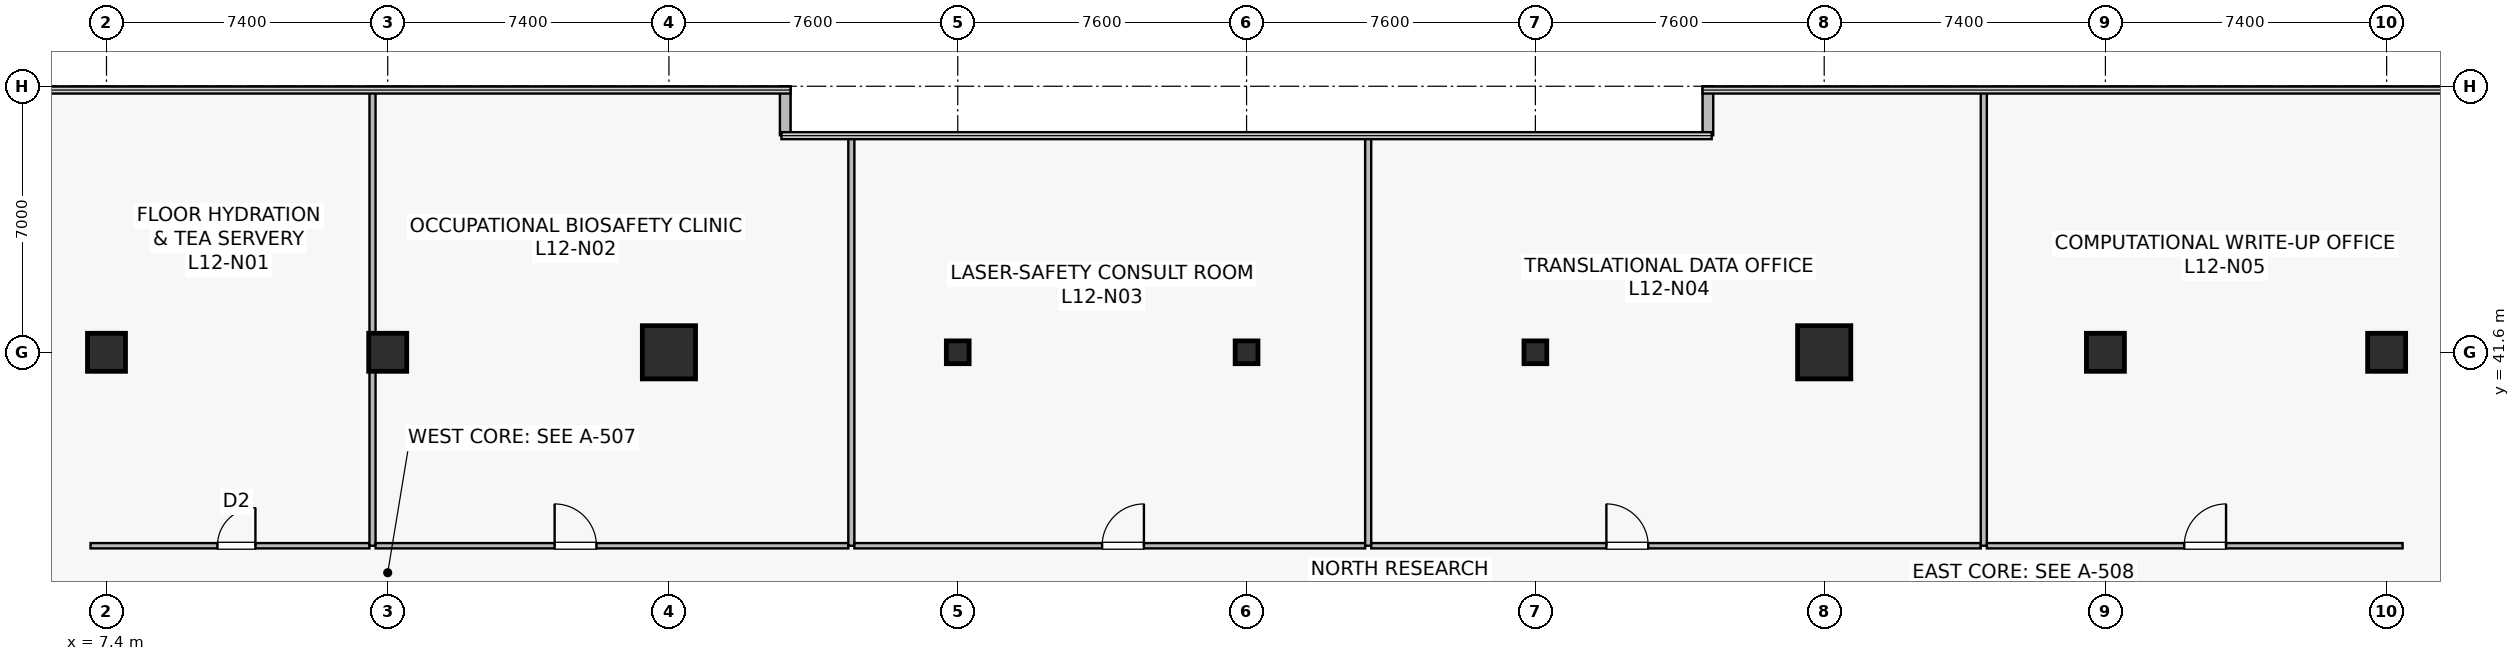
"""IFC4 building model, lengths in metres.
Left out: names, types, materials, properties, quantities, classifications, styles, units other than length and angle.
Written with IfcOpenShell. Run it as: python <this file> out.ifc"""

import sys

from ifc_helpers import new_model, si_unit, direction, frame, frame_2d, origin, origin_2d, place, context, subcontext, project, spatial, rectangle, hollow_rectangle, extrude, source, transform, mapped, element, fill, save


model = new_model("IFC4")
c1 = context("Model", 3, precision=1e-05, world=origin(), true_north=direction((0.0, 1.0)))
c2 = subcontext(c1, "Body", "Model", "MODEL_VIEW")
j1 = project(units=[si_unit("LENGTHUNIT", "METRE"), si_unit("PLANEANGLEUNIT", "RADIAN")], contexts=[c1])
p1 = place(None, origin())
s1 = spatial("IfcSite", under=j1, at=p1, CompositionType="ELEMENT")
p2 = place(p1, origin())
s2 = spatial("IfcBuilding", under=s1, at=p2, CompositionType="ELEMENT")
p3 = place(p2, frame((0.0, 0.0, 49.8)))
s3 = spatial("IfcBuildingStorey", under=s2, at=p3, CompositionType="ELEMENT", Elevation=49.8)
m1 = source(origin(), c2, "Body", "SweptSolid", [
    extrude(rectangle(XDim=1.0, YDim=1.0, at=origin_2d()), origin(), (0.0, 0.0, 1.0), 4.1),
])
p4 = place(p3, frame((14.8, 41.6, 0.0), z_axis=(0.0, 0.0, 1.0), x_axis=(1.0, 0.0, 0.0)))
e1 = element("IfcColumn", 1, at=p4, inside=s3, PredefinedType="COLUMN", context=c2, shape_type="MappedRepresentation", body=[
    mapped(m1, transform((0.0, 0.0, 0.0), scale=1.0)),
])
m2 = source(origin(), c2, "Body", "SweptSolid", [
    extrude(rectangle(XDim=1.4, YDim=1.4, at=origin_2d()), origin(), (0.0, 0.0, 1.0), 4.1),
])
for number, where, z_axis, x_axis in (
    (2, (22.2, 41.6, 0.0), (0.0, 0.0, 1.0), (1.0, 0.0, 0.0)),
    (3, (52.6, 41.6, 0.0), (0.0, 0.0, 1.0), (1.0, 0.0, 0.0)),
):
    element("IfcColumn", number, at=place(p3, frame(where, z_axis=z_axis, x_axis=x_axis)), inside=s3, PredefinedType="COLUMN", context=c2, shape_type="MappedRepresentation", body=[
        mapped(m2, transform((0.0, 0.0, 0.0), scale=1.0)),
    ])
for number, where, z_axis, x_axis in (
    (4, (60.0, 41.6, 0.0), (0.0, 0.0, 1.0), (1.0, 0.0, 0.0)),
    (5, (7.4, 41.6, 0.0), (0.0, 0.0, 1.0), (1.0, 0.0, 0.0)),
    (6, (67.4, 41.6, 0.0), (0.0, 0.0, 1.0), (1.0, 0.0, 0.0)),
):
    element("IfcColumn", number, at=place(p3, frame(where, z_axis=z_axis, x_axis=x_axis)), inside=s3, PredefinedType="COLUMN", context=c2, shape_type="MappedRepresentation", body=[
        mapped(m1, transform((0.0, 0.0, 0.0), scale=1.0)),
    ])
m3 = source(origin(), c2, "Body", "SweptSolid", [
    extrude(hollow_rectangle(XDim=0.6, YDim=0.6, WallThickness=0.028, at=origin_2d()), origin(), (0.0, 0.0, 1.0), 4.1),
])
for number, where, z_axis, x_axis in (
    (7, (29.8, 41.6, 0.0), (0.0, 0.0, 1.0), (1.0, 0.0, 0.0)),
    (8, (37.4, 41.6, 0.0), (0.0, 0.0, 1.0), (1.0, 0.0, 0.0)),
    (9, (45.0, 41.6, 0.0), (0.0, 0.0, 1.0), (1.0, 0.0, 0.0)),
):
    element("IfcColumn", number, at=place(p3, frame(where, z_axis=z_axis, x_axis=x_axis)), inside=s3, PredefinedType="COLUMN", context=c2, shape_type="MappedRepresentation", body=[
        mapped(m3, transform((0.0, 0.0, 0.0), scale=1.0)),
    ])
for number, where, z_axis, x_axis in (
    (10, (49.54, 48.6, 0.0), (0.0, 0.0, 1.0), (0.0, -1.0, 0.0)),
    (11, (25.26, 47.312, 0.0), (0.0, 0.0, 1.0), (0.0, 1.0, 0.0)),
):
    element("IfcWall", number, at=place(p3, frame(where, z_axis=z_axis, x_axis=x_axis)), inside=s3, PredefinedType="STANDARD", context=c2, shape_type="SweptSolid", body=[
        extrude(rectangle(XDim=1.288, YDim=0.28, at=frame_2d((0.644, 0.0))), origin(), (0.0, 0.0, 1.0), 3.78),
    ])
p5 = place(p3, frame((6.98, 36.51, 0.0), z_axis=(0.0, 0.0, 1.0), x_axis=(1.0, 0.0, 0.0)))
e12 = element("IfcWall", 12, at=p5, inside=s3, PredefinedType="PARTITIONING", context=c2, shape_type="SweptSolid", body=[
    extrude(rectangle(XDim=7.34, YDim=0.14, at=frame_2d((3.67, 0.0))), origin(), (0.0, 0.0, 1.0), 3.265),
])
p6 = place(p5, frame((3.339, 0.0, 0.0)))
e13 = element("IfcOpeningElement", 13, at=p6, cuts=e12, PredefinedType="OPENING", context=c2, shape_type="SweptSolid", body=[
    extrude(rectangle(XDim=1.0, YDim=2.15, at=frame_2d((0.5, 1.075))), frame((0.0, 0.08, 0.0), z_axis=(0.0, -1.0, 0.0), x_axis=(1.0, 0.0, 0.0)), (0.0, 0.0, 1.0), 0.16),
])
p7 = place(p3, frame((14.4, 36.51, 0.0), z_axis=(0.0, 0.0, 1.0), x_axis=(0.0, 1.0, 0.0)))
e14 = element("IfcWall", 14, at=p7, inside=s3, PredefinedType="PARTITIONING", context=c2, shape_type="SweptSolid", body=[
    extrude(rectangle(XDim=11.98, YDim=0.16, at=frame_2d((5.99, 0.0))), origin(), (0.0, 0.0, 1.0), 3.015),
])
p8 = place(p3, frame((14.48, 36.51, 0.0), z_axis=(0.0, 0.0, 1.0), x_axis=(1.0, 0.0, 0.0)))
e15 = element("IfcWall", 15, at=p8, inside=s3, PredefinedType="PARTITIONING", context=c2, shape_type="SweptSolid", body=[
    extrude(rectangle(XDim=12.44, YDim=0.14, at=frame_2d((6.22, 0.0))), origin(), (0.0, 0.0, 1.0), 3.065),
])
p9 = place(p8, frame((4.712, 0.0, 0.0)))
e16 = element("IfcOpeningElement", 16, at=p9, cuts=e15, PredefinedType="OPENING", context=c2, shape_type="SweptSolid", body=[
    extrude(rectangle(XDim=1.1, YDim=2.18, at=frame_2d((0.55, 1.09))), frame((0.0, 0.08, 0.0), z_axis=(0.0, -1.0, 0.0), x_axis=(1.0, 0.0, 0.0)), (0.0, 0.0, 1.0), 0.16),
])
p10 = place(p3, frame((27.0, 36.51, 0.0), z_axis=(0.0, 0.0, 1.0), x_axis=(0.0, 1.0, 0.0)))
e17 = element("IfcWall", 17, at=p10, inside=s3, PredefinedType="PARTITIONING", context=c2, shape_type="SweptSolid", body=[
    extrude(rectangle(XDim=10.78, YDim=0.16, at=frame_2d((5.39, 0.0))), origin(), (0.0, 0.0, 1.0), 3.015),
])
p11 = place(p3, frame((27.08, 36.51, 0.0), z_axis=(0.0, 0.0, 1.0), x_axis=(1.0, 0.0, 0.0)))
e18 = element("IfcWall", 18, at=p11, inside=s3, PredefinedType="PARTITIONING", context=c2, shape_type="SweptSolid", body=[
    extrude(rectangle(XDim=13.44, YDim=0.14, at=frame_2d((6.72, 0.0))), origin(), (0.0, 0.0, 1.0), 3.065),
])
p12 = place(p11, frame((6.519, 0.0, 0.0)))
e19 = element("IfcOpeningElement", 19, at=p12, cuts=e18, PredefinedType="OPENING", context=c2, shape_type="SweptSolid", body=[
    extrude(rectangle(XDim=1.1, YDim=2.18, at=frame_2d((0.55, 1.09))), frame((0.0, 0.08, 0.0), z_axis=(0.0, -1.0, 0.0), x_axis=(1.0, 0.0, 0.0)), (0.0, 0.0, 1.0), 0.16),
])
p13 = place(p3, frame((40.6, 36.51, 0.0), z_axis=(0.0, 0.0, 1.0), x_axis=(0.0, 1.0, 0.0)))
e20 = element("IfcWall", 20, at=p13, inside=s3, PredefinedType="PARTITIONING", context=c2, shape_type="SweptSolid", body=[
    extrude(rectangle(XDim=10.78, YDim=0.16, at=frame_2d((5.39, 0.0))), origin(), (0.0, 0.0, 1.0), 3.015),
])
p14 = place(p3, frame((40.68, 36.51, 0.0), z_axis=(0.0, 0.0, 1.0), x_axis=(1.0, 0.0, 0.0)))
e21 = element("IfcWall", 21, at=p14, inside=s3, PredefinedType="PARTITIONING", context=c2, shape_type="SweptSolid", body=[
    extrude(rectangle(XDim=16.04, YDim=0.14, at=frame_2d((8.02, 0.0))), origin(), (0.0, 0.0, 1.0), 3.065),
])
p15 = place(p14, frame((6.188, 0.0, 0.0)))
e22 = element("IfcOpeningElement", 22, at=p15, cuts=e21, PredefinedType="OPENING", context=c2, shape_type="SweptSolid", body=[
    extrude(rectangle(XDim=1.1, YDim=2.18, at=frame_2d((0.55, 1.09))), frame((0.0, 0.08, 0.0), z_axis=(0.0, -1.0, 0.0), x_axis=(1.0, 0.0, 0.0)), (0.0, 0.0, 1.0), 0.16),
])
p16 = place(p3, frame((56.8, 36.51, 0.0), z_axis=(0.0, 0.0, 1.0), x_axis=(0.0, 1.0, 0.0)))
e23 = element("IfcWall", 23, at=p16, inside=s3, PredefinedType="PARTITIONING", context=c2, shape_type="SweptSolid", body=[
    extrude(rectangle(XDim=11.98, YDim=0.16, at=frame_2d((5.99, 0.0))), origin(), (0.0, 0.0, 1.0), 3.015),
])
p17 = place(p3, frame((56.88, 36.51, 0.0), z_axis=(0.0, 0.0, 1.0), x_axis=(1.0, 0.0, 0.0)))
e24 = element("IfcWall", 24, at=p17, inside=s3, PredefinedType="PARTITIONING", context=c2, shape_type="SweptSolid", body=[
    extrude(rectangle(XDim=10.94, YDim=0.14, at=frame_2d((5.47, 0.0))), origin(), (0.0, 0.0, 1.0), 3.065),
])
p18 = place(p17, frame((5.194, 0.0, 0.0)))
e25 = element("IfcOpeningElement", 25, at=p18, cuts=e24, PredefinedType="OPENING", context=c2, shape_type="SweptSolid", body=[
    extrude(rectangle(XDim=1.1, YDim=2.18, at=frame_2d((0.55, 1.09))), frame((0.0, 0.08, 0.0), z_axis=(0.0, -1.0, 0.0), x_axis=(1.0, 0.0, 0.0)), (0.0, 0.0, 1.0), 0.16),
])
m4 = source(origin(), c2, "Body", "SweptSolid", [
    extrude(rectangle(XDim=1.0, YDim=2.15, at=frame_2d((0.5, 1.075))), frame((0.0, 0.025, 0.0), z_axis=(0.0, -1.0, 0.0), x_axis=(1.0, 0.0, 0.0)), (0.0, 0.0, 1.0), 0.05),
])
p19 = place(p6, origin())
e26 = element("IfcDoor", 26, at=p19, inside=s3, OperationType="SINGLE_SWING_RIGHT", PredefinedType="DOOR", context=c2, shape_type="MappedRepresentation", body=[
    mapped(m4, transform((0.0, 0.0, 0.0), scale=1.0)),
])
fill(e13, e26)
m5 = source(origin(), c2, "Body", "SweptSolid", [
    extrude(rectangle(XDim=1.1, YDim=2.18, at=frame_2d((0.55, 1.09))), frame((0.0, 0.025, 0.0), z_axis=(0.0, -1.0, 0.0), x_axis=(1.0, 0.0, 0.0)), (0.0, 0.0, 1.0), 0.05),
])
p20 = place(p9, origin())
e27 = element("IfcDoor", 27, at=p20, inside=s3, OperationType="SINGLE_SWING_LEFT", PredefinedType="DOOR", context=c2, shape_type="MappedRepresentation", body=[
    mapped(m5, transform((0.0, 0.0, 0.0), scale=1.0)),
])
fill(e16, e27)
p21 = place(p12, origin())
e28 = element("IfcDoor", 28, at=p21, inside=s3, OperationType="SINGLE_SWING_RIGHT", PredefinedType="DOOR", context=c2, shape_type="MappedRepresentation", body=[
    mapped(m5, transform((0.0, 0.0, 0.0), scale=1.0)),
])
fill(e19, e28)
p22 = place(p15, origin())
e29 = element("IfcDoor", 29, at=p22, inside=s3, OperationType="SINGLE_SWING_LEFT", PredefinedType="DOOR", context=c2, shape_type="MappedRepresentation", body=[
    mapped(m5, transform((0.0, 0.0, 0.0), scale=1.0)),
])
fill(e22, e29)
p23 = place(p18, origin())
e30 = element("IfcDoor", 30, at=p23, inside=s3, OperationType="SINGLE_SWING_RIGHT", PredefinedType="DOOR", context=c2, shape_type="MappedRepresentation", body=[
    mapped(m5, transform((0.0, 0.0, 0.0), scale=1.0)),
])
fill(e25, e30)
save(model, sys.argv[1])
